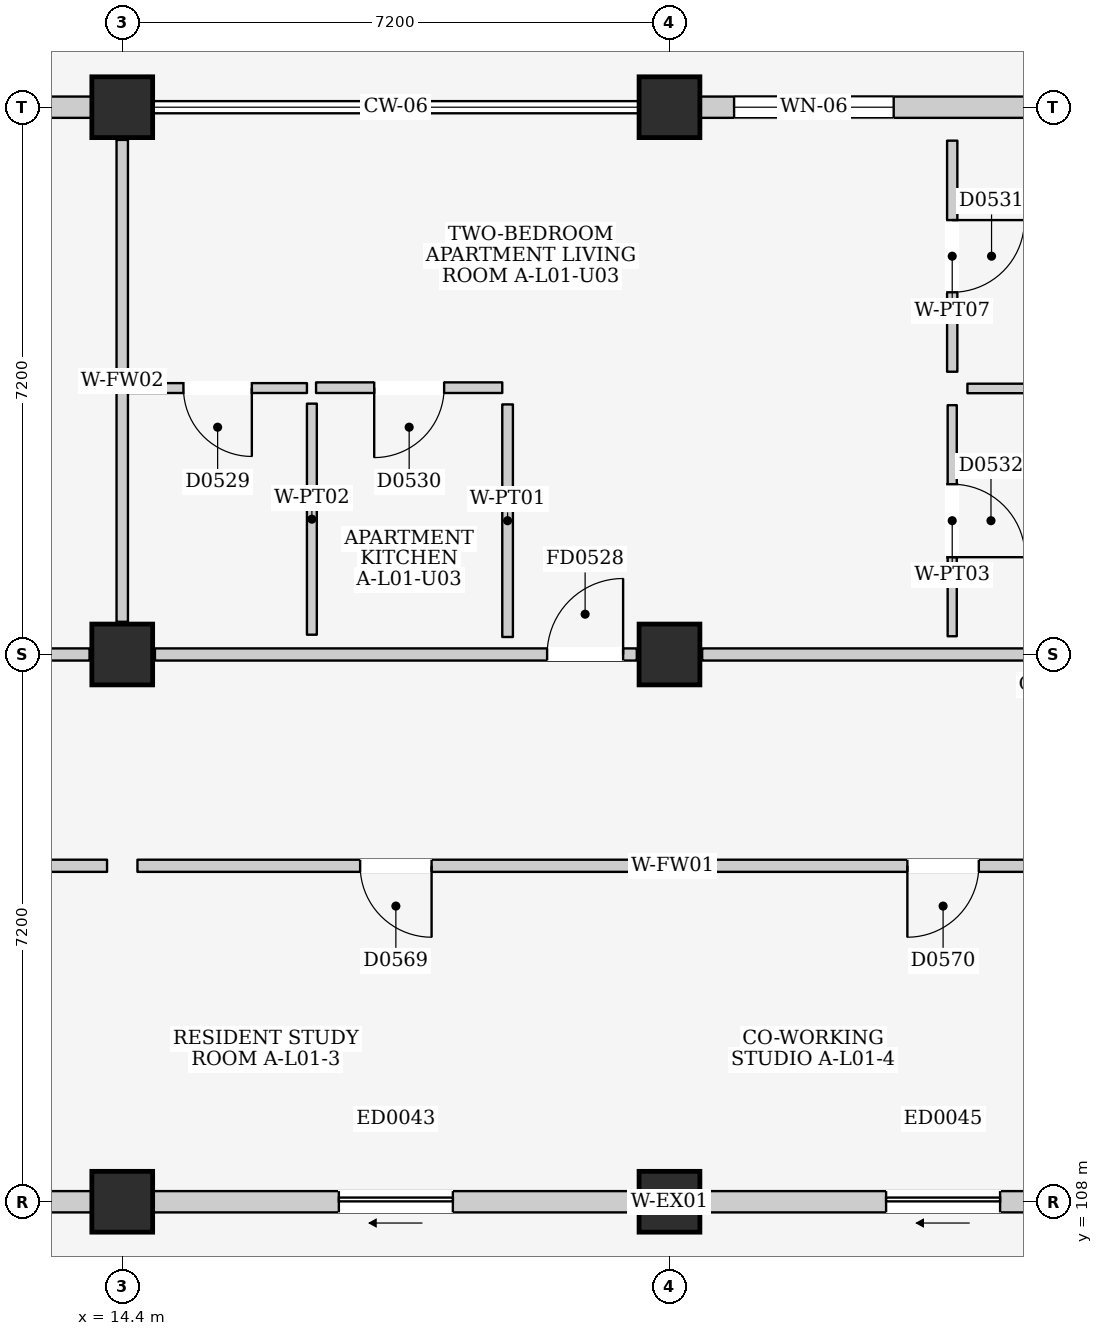
"""IFC4 building model, lengths in metres.
Left out: names, types, materials, properties, quantities, classifications, styles, units other than length and angle.
Written with IfcOpenShell. Run it as: python <this file> out.ifc"""

import sys

from ifc_helpers import new_model, si_unit, direction, frame, frame_2d, origin, origin_2d, place, context, subcontext, project, spatial, rectangle, extrude, element, fill, save


model = new_model("IFC4")
c1 = context("Model", 3, precision=1e-05, world=origin(), true_north=direction((0.0, 1.0)))
c2 = subcontext(c1, "Body", "Model", "MODEL_VIEW")
j1 = project(units=[si_unit("LENGTHUNIT", "METRE"), si_unit("PLANEANGLEUNIT", "RADIAN")], contexts=[c1])
p1 = place(None, origin())
s1 = spatial("IfcSite", under=j1, at=p1, CompositionType="ELEMENT")
p2 = place(p1, origin())
s2 = spatial("IfcBuilding", under=s1, at=p2, CompositionType="ELEMENT")
p3 = place(p2, frame((0.0, 0.0, 4.5)))
s3 = spatial("IfcBuildingStorey", under=s2, at=p3, CompositionType="ELEMENT", Elevation=4.5)
for number, where, z_axis, x_axis in (
    (1, (14.4, 108.0, 0.0), (0.0, 0.0, 1.0), (1.0, 0.0, 0.0)),
    (2, (14.4, 115.2, 0.0), (0.0, 0.0, 1.0), (1.0, 0.0, 0.0)),
    (3, (14.4, 122.4, 0.0), (0.0, 0.0, 1.0), (1.0, 0.0, 0.0)),
    (4, (21.6, 108.0, 0.0), (0.0, 0.0, 1.0), (1.0, 0.0, 0.0)),
    (5, (21.6, 115.2, 0.0), (0.0, 0.0, 1.0), (1.0, 0.0, 0.0)),
    (6, (21.6, 122.4, 0.0), (0.0, 0.0, 1.0), (1.0, 0.0, 0.0)),
):
    element("IfcColumn", number, at=place(p3, frame(where, z_axis=z_axis, x_axis=x_axis)), inside=s3, PredefinedType="COLUMN", context=c2, shape_type="SweptSolid", body=[
        extrude(rectangle(XDim=0.8, YDim=0.8, at=origin_2d()), origin(), (0.0, 0.0, 1.0), 4.5),
    ])
p4 = place(p3, frame((7.6, 122.4, 0.0), z_axis=(0.0, 0.0, 1.0), x_axis=(1.0, 0.0, 0.0)))
e7 = element("IfcWall", 7, at=p4, inside=s3, PredefinedType="ELEMENTEDWALL", context=c2, shape_type="SweptSolid", body=[
    extrude(rectangle(XDim=6.4, YDim=0.28, at=frame_2d((3.2, 0.0))), origin(), (0.0, 0.0, 1.0), 3.715),
])
p5 = place(p4, frame((3.45, 0.0, 0.0)))
e8 = element("IfcOpeningElement", 8, at=p5, cuts=e7, PredefinedType="OPENING", context=c2, shape_type="SweptSolid", body=[
    extrude(rectangle(XDim=2.4, YDim=2.12, at=frame_2d((1.2, 1.06))), frame((0.0, 0.155, 0.0), z_axis=(0.0, -1.0, 0.0), x_axis=(1.0, 0.0, 0.0)), (0.0, 0.0, 1.0), 0.31),
])
p6 = place(p4, frame((0.45, 0.0, 0.9)))
e9 = element("IfcOpeningElement", 9, at=p6, cuts=e7, PredefinedType="OPENING", context=c2, shape_type="SweptSolid", body=[
    extrude(rectangle(XDim=0.9, YDim=1.1, at=frame_2d((0.45, 0.55))), frame((0.0, 0.155, 0.0), z_axis=(0.0, -1.0, 0.0), x_axis=(1.0, 0.0, 0.0)), (0.0, 0.0, 1.0), 0.31),
])
p7 = place(p3, frame((7.6, 108.0, 0.0), z_axis=(0.0, 0.0, 1.0), x_axis=(1.0, 0.0, 0.0)))
e10 = element("IfcWall", 10, at=p7, inside=s3, PredefinedType="ELEMENTEDWALL", context=c2, shape_type="SweptSolid", body=[
    extrude(rectangle(XDim=6.4, YDim=0.28, at=frame_2d((3.2, 0.0))), origin(), (0.0, 0.0, 1.0), 3.585),
])
p8 = place(p7, frame((2.45, 0.0, 0.0)))
e11 = element("IfcOpeningElement", 11, at=p8, cuts=e10, PredefinedType="OPENING", context=c2, shape_type="SweptSolid", body=[
    extrude(rectangle(XDim=1.5, YDim=2.12, at=frame_2d((0.75, 1.06))), frame((0.0, 0.155, 0.0), z_axis=(0.0, -1.0, 0.0), x_axis=(1.0, 0.0, 0.0)), (0.0, 0.0, 1.0), 0.31),
])
p9 = place(p3, frame((14.8, 108.0, 0.0), z_axis=(0.0, 0.0, 1.0), x_axis=(1.0, 0.0, 0.0)))
e12 = element("IfcWall", 12, at=p9, inside=s3, PredefinedType="ELEMENTEDWALL", context=c2, shape_type="SweptSolid", body=[
    extrude(rectangle(XDim=6.4, YDim=0.28, at=frame_2d((3.2, 0.0))), origin(), (0.0, 0.0, 1.0), 3.585),
])
p10 = place(p9, frame((2.45, 0.0, 0.0)))
e13 = element("IfcOpeningElement", 13, at=p10, cuts=e12, PredefinedType="OPENING", context=c2, shape_type="SweptSolid", body=[
    extrude(rectangle(XDim=1.5, YDim=2.12, at=frame_2d((0.75, 1.06))), frame((0.0, 0.155, 0.0), z_axis=(0.0, -1.0, 0.0), x_axis=(1.0, 0.0, 0.0)), (0.0, 0.0, 1.0), 0.31),
])
p11 = place(p3, frame((22.0, 122.4, 0.0), z_axis=(0.0, 0.0, 1.0), x_axis=(1.0, 0.0, 0.0)))
e14 = element("IfcWall", 14, at=p11, inside=s3, PredefinedType="ELEMENTEDWALL", context=c2, shape_type="SweptSolid", body=[
    extrude(rectangle(XDim=6.4, YDim=0.28, at=frame_2d((3.2, 0.0))), origin(), (0.0, 0.0, 1.0), 3.715),
])
p12 = place(p11, frame((4.45, 0.0, 0.0)))
e15 = element("IfcOpeningElement", 15, at=p12, cuts=e14, PredefinedType="OPENING", context=c2, shape_type="SweptSolid", body=[
    extrude(rectangle(XDim=1.4, YDim=2.1, at=frame_2d((0.7, 1.05))), frame((0.0, 0.155, 0.0), z_axis=(0.0, -1.0, 0.0), x_axis=(1.0, 0.0, 0.0)), (0.0, 0.0, 1.0), 0.31),
])
p13 = place(p11, frame((0.45, 0.0, 0.9)))
e16 = element("IfcOpeningElement", 16, at=p13, cuts=e14, PredefinedType="OPENING", context=c2, shape_type="SweptSolid", body=[
    extrude(rectangle(XDim=2.1, YDim=1.65, at=frame_2d((1.05, 0.825))), frame((0.0, 0.155, 0.0), z_axis=(0.0, -1.0, 0.0), x_axis=(1.0, 0.0, 0.0)), (0.0, 0.0, 1.0), 0.31),
])
p14 = place(p3, frame((22.0, 108.0, 0.0), z_axis=(0.0, 0.0, 1.0), x_axis=(1.0, 0.0, 0.0)))
e17 = element("IfcWall", 17, at=p14, inside=s3, PredefinedType="ELEMENTEDWALL", context=c2, shape_type="SweptSolid", body=[
    extrude(rectangle(XDim=6.4, YDim=0.28, at=frame_2d((3.2, 0.0))), origin(), (0.0, 0.0, 1.0), 3.585),
])
p15 = place(p14, frame((2.45, 0.0, 0.0)))
e18 = element("IfcOpeningElement", 18, at=p15, cuts=e17, PredefinedType="OPENING", context=c2, shape_type="SweptSolid", body=[
    extrude(rectangle(XDim=1.5, YDim=2.12, at=frame_2d((0.75, 1.06))), frame((0.0, 0.155, 0.0), z_axis=(0.0, -1.0, 0.0), x_axis=(1.0, 0.0, 0.0)), (0.0, 0.0, 1.0), 0.31),
])
p16 = place(p3, frame((7.63, 115.2, 0.0), z_axis=(0.0, 0.0, 1.0), x_axis=(1.0, 0.0, 0.0)))
e19 = element("IfcWall", 19, at=p16, inside=s3, PredefinedType="PARTITIONING", context=c2, shape_type="SweptSolid", body=[
    extrude(rectangle(XDim=6.34, YDim=0.16, at=frame_2d((3.17, 0.0))), origin(), (0.0, 0.0, 1.0), 3.585),
])
p17 = place(p16, frame((2.645, 0.0, 0.0)))
e20 = element("IfcOpeningElement", 20, at=p17, cuts=e19, PredefinedType="OPENING", context=c2, shape_type="SweptSolid", body=[
    extrude(rectangle(XDim=1.05, YDim=2.2, at=frame_2d((0.525, 1.1))), frame((0.0, 0.095, 0.0), z_axis=(0.0, -1.0, 0.0), x_axis=(1.0, 0.0, 0.0)), (0.0, 0.0, 1.0), 0.19),
])
p18 = place(p3, frame((14.4, 115.63, 0.0), z_axis=(0.0, 0.0, 1.0), x_axis=(0.0, 1.0, 0.0)))
e21 = element("IfcWall", 21, at=p18, inside=s3, PredefinedType="PARTITIONING", context=c2, shape_type="SweptSolid", body=[
    extrude(rectangle(XDim=6.34, YDim=0.15, at=frame_2d((3.17, 0.0))), origin(), (0.0, 0.0, 1.0), 3.685),
])
p19 = place(p3, frame((14.83, 115.2, 0.0), z_axis=(0.0, 0.0, 1.0), x_axis=(1.0, 0.0, 0.0)))
e22 = element("IfcWall", 22, at=p19, inside=s3, PredefinedType="PARTITIONING", context=c2, shape_type="SweptSolid", body=[
    extrude(rectangle(XDim=6.34, YDim=0.16, at=frame_2d((3.17, 0.0))), origin(), (0.0, 0.0, 1.0), 3.585),
])
p20 = place(p19, frame((5.16, 0.0, 0.0)))
e23 = element("IfcOpeningElement", 23, at=p20, cuts=e22, PredefinedType="OPENING", context=c2, shape_type="SweptSolid", body=[
    extrude(rectangle(XDim=1.0, YDim=2.15, at=frame_2d((0.5, 1.075))), frame((0.0, 0.095, 0.0), z_axis=(0.0, -1.0, 0.0), x_axis=(1.0, 0.0, 0.0)), (0.0, 0.0, 1.0), 0.19),
])
p21 = place(p3, frame((22.03, 115.2, 0.0), z_axis=(0.0, 0.0, 1.0), x_axis=(1.0, 0.0, 0.0)))
e24 = element("IfcWall", 24, at=p21, inside=s3, PredefinedType="PARTITIONING", context=c2, shape_type="SweptSolid", body=[
    extrude(rectangle(XDim=6.34, YDim=0.16, at=frame_2d((3.17, 0.0))), origin(), (0.0, 0.0, 1.0), 3.585),
])
p22 = place(p3, frame((14.48, 118.705, 0.0), z_axis=(0.0, 0.0, 1.0), x_axis=(1.0, 0.0, 0.0)))
e25 = element("IfcWall", 25, at=p22, inside=s3, PredefinedType="PARTITIONING", context=c2, shape_type="SweptSolid", body=[
    extrude(rectangle(XDim=2.35, YDim=0.13, at=frame_2d((1.175, 0.0))), origin(), (0.0, 0.0, 1.0), 4.25),
])
p23 = place(p22, frame((0.725, 0.0, 0.0)))
e26 = element("IfcOpeningElement", 26, at=p23, cuts=e25, PredefinedType="OPENING", context=c2, shape_type="SweptSolid", body=[
    extrude(rectangle(XDim=0.9, YDim=2.1, at=frame_2d((0.45, 1.05))), frame((0.0, 0.08, 0.0), z_axis=(0.0, -1.0, 0.0), x_axis=(1.0, 0.0, 0.0)), (0.0, 0.0, 1.0), 0.16),
])
p24 = place(p3, frame((16.895, 115.46, 0.0), z_axis=(0.0, 0.0, 1.0), x_axis=(0.0, 1.0, 0.0)))
e27 = element("IfcWall", 27, at=p24, inside=s3, PredefinedType="PARTITIONING", context=c2, shape_type="SweptSolid", body=[
    extrude(rectangle(XDim=3.04, YDim=0.13, at=frame_2d((1.52, 0.0))), origin(), (0.0, 0.0, 1.0), 4.25),
])
p25 = place(p3, frame((16.95, 118.71, 0.0), z_axis=(0.0, 0.0, 1.0), x_axis=(1.0, 0.0, 0.0)))
e28 = element("IfcWall", 28, at=p25, inside=s3, PredefinedType="PARTITIONING", context=c2, shape_type="SweptSolid", body=[
    extrude(rectangle(XDim=2.45, YDim=0.14, at=frame_2d((1.225, 0.0))), origin(), (0.0, 0.0, 1.0), 4.25),
])
p26 = place(p25, frame((0.765, 0.0, 0.0)))
e29 = element("IfcOpeningElement", 29, at=p26, cuts=e28, PredefinedType="OPENING", context=c2, shape_type="SweptSolid", body=[
    extrude(rectangle(XDim=0.92, YDim=2.1, at=frame_2d((0.46, 1.05))), frame((0.0, 0.085, 0.0), z_axis=(0.0, -1.0, 0.0), x_axis=(1.0, 0.0, 0.0)), (0.0, 0.0, 1.0), 0.17),
])
p27 = place(p3, frame((19.47, 115.43, 0.0), z_axis=(0.0, 0.0, 1.0), x_axis=(0.0, 1.0, 0.0)))
e30 = element("IfcWall", 30, at=p27, inside=s3, PredefinedType="PARTITIONING", context=c2, shape_type="SweptSolid", body=[
    extrude(rectangle(XDim=3.06, YDim=0.14, at=frame_2d((1.53, 0.0))), origin(), (0.0, 0.0, 1.0), 4.25),
])
p28 = place(p3, frame((25.32, 118.92, 0.0), z_axis=(0.0, 0.0, 1.0), x_axis=(0.0, 1.0, 0.0)))
e31 = element("IfcWall", 31, at=p28, inside=s3, PredefinedType="PARTITIONING", context=c2, shape_type="SweptSolid", body=[
    extrude(rectangle(XDim=3.04, YDim=0.135, at=frame_2d((1.52, 0.0))), origin(), (0.0, 0.0, 1.0), 4.25),
])
p29 = place(p28, frame((1.045, 0.0, 0.0)))
e32 = element("IfcOpeningElement", 32, at=p29, cuts=e31, PredefinedType="OPENING", context=c2, shape_type="SweptSolid", body=[
    extrude(rectangle(XDim=0.95, YDim=2.15, at=frame_2d((0.475, 1.075))), frame((0.0, 0.083, 0.0), z_axis=(0.0, -1.0, 0.0), x_axis=(1.0, 0.0, 0.0)), (0.0, 0.0, 1.0), 0.165),
])
p30 = place(p3, frame((25.52, 118.7, 0.0), z_axis=(0.0, 0.0, 1.0), x_axis=(1.0, 0.0, 0.0)))
e33 = element("IfcWall", 33, at=p30, inside=s3, PredefinedType="PARTITIONING", context=c2, shape_type="SweptSolid", body=[
    extrude(rectangle(XDim=3.06, YDim=0.125, at=frame_2d((1.53, 0.0))), origin(), (0.0, 0.0, 1.0), 4.25),
])
p31 = place(p3, frame((25.32, 115.44, 0.0), z_axis=(0.0, 0.0, 1.0), x_axis=(0.0, 1.0, 0.0)))
e34 = element("IfcWall", 34, at=p31, inside=s3, PredefinedType="PARTITIONING", context=c2, shape_type="SweptSolid", body=[
    extrude(rectangle(XDim=3.04, YDim=0.12, at=frame_2d((1.52, 0.0))), origin(), (0.0, 0.0, 1.0), 4.25),
])
p32 = place(p31, frame((1.04, 0.0, 0.0)))
e35 = element("IfcOpeningElement", 35, at=p32, cuts=e34, PredefinedType="OPENING", context=c2, shape_type="SweptSolid", body=[
    extrude(rectangle(XDim=0.96, YDim=2.15, at=frame_2d((0.48, 1.075))), frame((0.0, 0.075, 0.0), z_axis=(0.0, -1.0, 0.0), x_axis=(1.0, 0.0, 0.0)), (0.0, 0.0, 1.0), 0.15),
])
p33 = place(p3, frame((7.4, 112.42, 0.0), z_axis=(0.0, 0.0, 1.0), x_axis=(1.0, 0.0, 0.0)))
e36 = element("IfcWall", 36, at=p33, inside=s3, PredefinedType="PARTITIONING", context=c2, shape_type="SweptSolid", body=[
    extrude(rectangle(XDim=6.8, YDim=0.16, at=frame_2d((3.4, 0.0))), origin(), (0.0, 0.0, 1.0), 4.25),
])
p34 = place(p33, frame((2.93, 0.0, 0.0)))
e37 = element("IfcOpeningElement", 37, at=p34, cuts=e36, PredefinedType="OPENING", context=c2, shape_type="SweptSolid", body=[
    extrude(rectangle(XDim=0.94, YDim=2.12, at=frame_2d((0.47, 1.06))), frame((0.0, 0.095, 0.0), z_axis=(0.0, -1.0, 0.0), x_axis=(1.0, 0.0, 0.0)), (0.0, 0.0, 1.0), 0.19),
])
p35 = place(p3, frame((14.6, 112.42, 0.0), z_axis=(0.0, 0.0, 1.0), x_axis=(1.0, 0.0, 0.0)))
e38 = element("IfcWall", 38, at=p35, inside=s3, PredefinedType="PARTITIONING", context=c2, shape_type="SweptSolid", body=[
    extrude(rectangle(XDim=6.8, YDim=0.16, at=frame_2d((3.4, 0.0))), origin(), (0.0, 0.0, 1.0), 4.25),
])
p36 = place(p35, frame((2.93, 0.0, 0.0)))
e39 = element("IfcOpeningElement", 39, at=p36, cuts=e38, PredefinedType="OPENING", context=c2, shape_type="SweptSolid", body=[
    extrude(rectangle(XDim=0.94, YDim=2.12, at=frame_2d((0.47, 1.06))), frame((0.0, 0.095, 0.0), z_axis=(0.0, -1.0, 0.0), x_axis=(1.0, 0.0, 0.0)), (0.0, 0.0, 1.0), 0.19),
])
p37 = place(p3, frame((21.8, 112.42, 0.0), z_axis=(0.0, 0.0, 1.0), x_axis=(1.0, 0.0, 0.0)))
e40 = element("IfcWall", 40, at=p37, inside=s3, PredefinedType="PARTITIONING", context=c2, shape_type="SweptSolid", body=[
    extrude(rectangle(XDim=6.8, YDim=0.16, at=frame_2d((3.4, 0.0))), origin(), (0.0, 0.0, 1.0), 4.25),
])
p38 = place(p37, frame((2.93, 0.0, 0.0)))
e41 = element("IfcOpeningElement", 41, at=p38, cuts=e40, PredefinedType="OPENING", context=c2, shape_type="SweptSolid", body=[
    extrude(rectangle(XDim=0.94, YDim=2.12, at=frame_2d((0.47, 1.06))), frame((0.0, 0.095, 0.0), z_axis=(0.0, -1.0, 0.0), x_axis=(1.0, 0.0, 0.0)), (0.0, 0.0, 1.0), 0.19),
])
p39 = place(p10, frame((1.5, 0.0, 0.0), z_axis=(0.0, 0.0, 1.0), x_axis=(-1.0, 0.0, 0.0)))
e42 = element("IfcDoor", 42, at=p39, inside=s3, OperationType="SLIDING_TO_LEFT", PredefinedType="DOOR", context=c2, shape_type="SweptSolid", body=[
    extrude(rectangle(XDim=1.5, YDim=2.12, at=frame_2d((0.75, 1.06))), frame((0.0, 0.025, 0.0), z_axis=(0.0, -1.0, 0.0), x_axis=(1.0, 0.0, 0.0)), (0.0, 0.0, 1.0), 0.05),
])
fill(e13, e42)
p40 = place(p13, origin())
e43 = element("IfcWindow", 43, at=p40, inside=s3, PartitioningType="DOUBLE_PANEL_VERTICAL", PredefinedType="WINDOW", context=c2, shape_type="SweptSolid", body=[
    extrude(rectangle(XDim=2.1, YDim=1.65, at=frame_2d((1.05, 0.825))), frame((0.0, 0.03, 0.0), z_axis=(0.0, -1.0, 0.0), x_axis=(1.0, 0.0, 0.0)), (0.0, 0.0, 1.0), 0.06),
])
fill(e16, e43)
p41 = place(p15, frame((1.5, 0.0, 0.0), z_axis=(0.0, 0.0, 1.0), x_axis=(-1.0, 0.0, 0.0)))
e44 = element("IfcDoor", 44, at=p41, inside=s3, OperationType="SLIDING_TO_LEFT", PredefinedType="DOOR", context=c2, shape_type="SweptSolid", body=[
    extrude(rectangle(XDim=1.5, YDim=2.12, at=frame_2d((0.75, 1.06))), frame((0.0, 0.025, 0.0), z_axis=(0.0, -1.0, 0.0), x_axis=(1.0, 0.0, 0.0)), (0.0, 0.0, 1.0), 0.05),
])
fill(e18, e44)
p42 = place(p20, origin())
e45 = element("IfcDoor", 45, at=p42, inside=s3, OperationType="SINGLE_SWING_RIGHT", PredefinedType="DOOR", context=c2, shape_type="SweptSolid", body=[
    extrude(rectangle(XDim=1.0, YDim=2.15, at=frame_2d((0.5, 1.075))), frame((0.0, 0.025, 0.0), z_axis=(0.0, -1.0, 0.0), x_axis=(1.0, 0.0, 0.0)), (0.0, 0.0, 1.0), 0.05),
])
fill(e23, e45)
p43 = place(p23, frame((0.9, 0.0, 0.0), z_axis=(0.0, 0.0, 1.0), x_axis=(-1.0, 0.0, 0.0)))
e46 = element("IfcDoor", 46, at=p43, inside=s3, OperationType="SINGLE_SWING_LEFT", PredefinedType="DOOR", context=c2, shape_type="SweptSolid", body=[
    extrude(rectangle(XDim=0.9, YDim=2.1, at=frame_2d((0.45, 1.05))), frame((0.0, 0.025, 0.0), z_axis=(0.0, -1.0, 0.0), x_axis=(1.0, 0.0, 0.0)), (0.0, 0.0, 1.0), 0.05),
])
fill(e26, e46)
p44 = place(p26, frame((0.92, 0.0, 0.0), z_axis=(0.0, 0.0, 1.0), x_axis=(-1.0, 0.0, 0.0)))
e47 = element("IfcDoor", 47, at=p44, inside=s3, OperationType="SINGLE_SWING_RIGHT", PredefinedType="DOOR", context=c2, shape_type="SweptSolid", body=[
    extrude(rectangle(XDim=0.92, YDim=2.1, at=frame_2d((0.46, 1.05))), frame((0.0, 0.025, 0.0), z_axis=(0.0, -1.0, 0.0), x_axis=(1.0, 0.0, 0.0)), (0.0, 0.0, 1.0), 0.05),
])
fill(e29, e47)
p45 = place(p29, frame((0.95, 0.0, 0.0), z_axis=(0.0, 0.0, 1.0), x_axis=(-1.0, 0.0, 0.0)))
e48 = element("IfcDoor", 48, at=p45, inside=s3, OperationType="SINGLE_SWING_LEFT", PredefinedType="DOOR", context=c2, shape_type="SweptSolid", body=[
    extrude(rectangle(XDim=0.95, YDim=2.15, at=frame_2d((0.475, 1.075))), frame((0.0, 0.025, 0.0), z_axis=(0.0, -1.0, 0.0), x_axis=(1.0, 0.0, 0.0)), (0.0, 0.0, 1.0), 0.05),
])
fill(e32, e48)
p46 = place(p32, frame((0.96, 0.0, 0.0), z_axis=(0.0, 0.0, 1.0), x_axis=(-1.0, 0.0, 0.0)))
e49 = element("IfcDoor", 49, at=p46, inside=s3, OperationType="SINGLE_SWING_RIGHT", PredefinedType="DOOR", context=c2, shape_type="SweptSolid", body=[
    extrude(rectangle(XDim=0.96, YDim=2.15, at=frame_2d((0.48, 1.075))), frame((0.0, 0.025, 0.0), z_axis=(0.0, -1.0, 0.0), x_axis=(1.0, 0.0, 0.0)), (0.0, 0.0, 1.0), 0.05),
])
fill(e35, e49)
p47 = place(p36, frame((0.94, 0.0, 0.0), z_axis=(0.0, 0.0, 1.0), x_axis=(-1.0, 0.0, 0.0)))
e50 = element("IfcDoor", 50, at=p47, inside=s3, OperationType="SINGLE_SWING_LEFT", PredefinedType="DOOR", context=c2, shape_type="SweptSolid", body=[
    extrude(rectangle(XDim=0.94, YDim=2.12, at=frame_2d((0.47, 1.06))), frame((0.0, 0.025, 0.0), z_axis=(0.0, -1.0, 0.0), x_axis=(1.0, 0.0, 0.0)), (0.0, 0.0, 1.0), 0.05),
])
fill(e39, e50)
p48 = place(p38, frame((0.94, 0.0, 0.0), z_axis=(0.0, 0.0, 1.0), x_axis=(-1.0, 0.0, 0.0)))
e51 = element("IfcDoor", 51, at=p48, inside=s3, OperationType="SINGLE_SWING_RIGHT", PredefinedType="DOOR", context=c2, shape_type="SweptSolid", body=[
    extrude(rectangle(XDim=0.94, YDim=2.12, at=frame_2d((0.47, 1.06))), frame((0.0, 0.025, 0.0), z_axis=(0.0, -1.0, 0.0), x_axis=(1.0, 0.0, 0.0)), (0.0, 0.0, 1.0), 0.05),
])
fill(e41, e51)
save(model, sys.argv[1])
